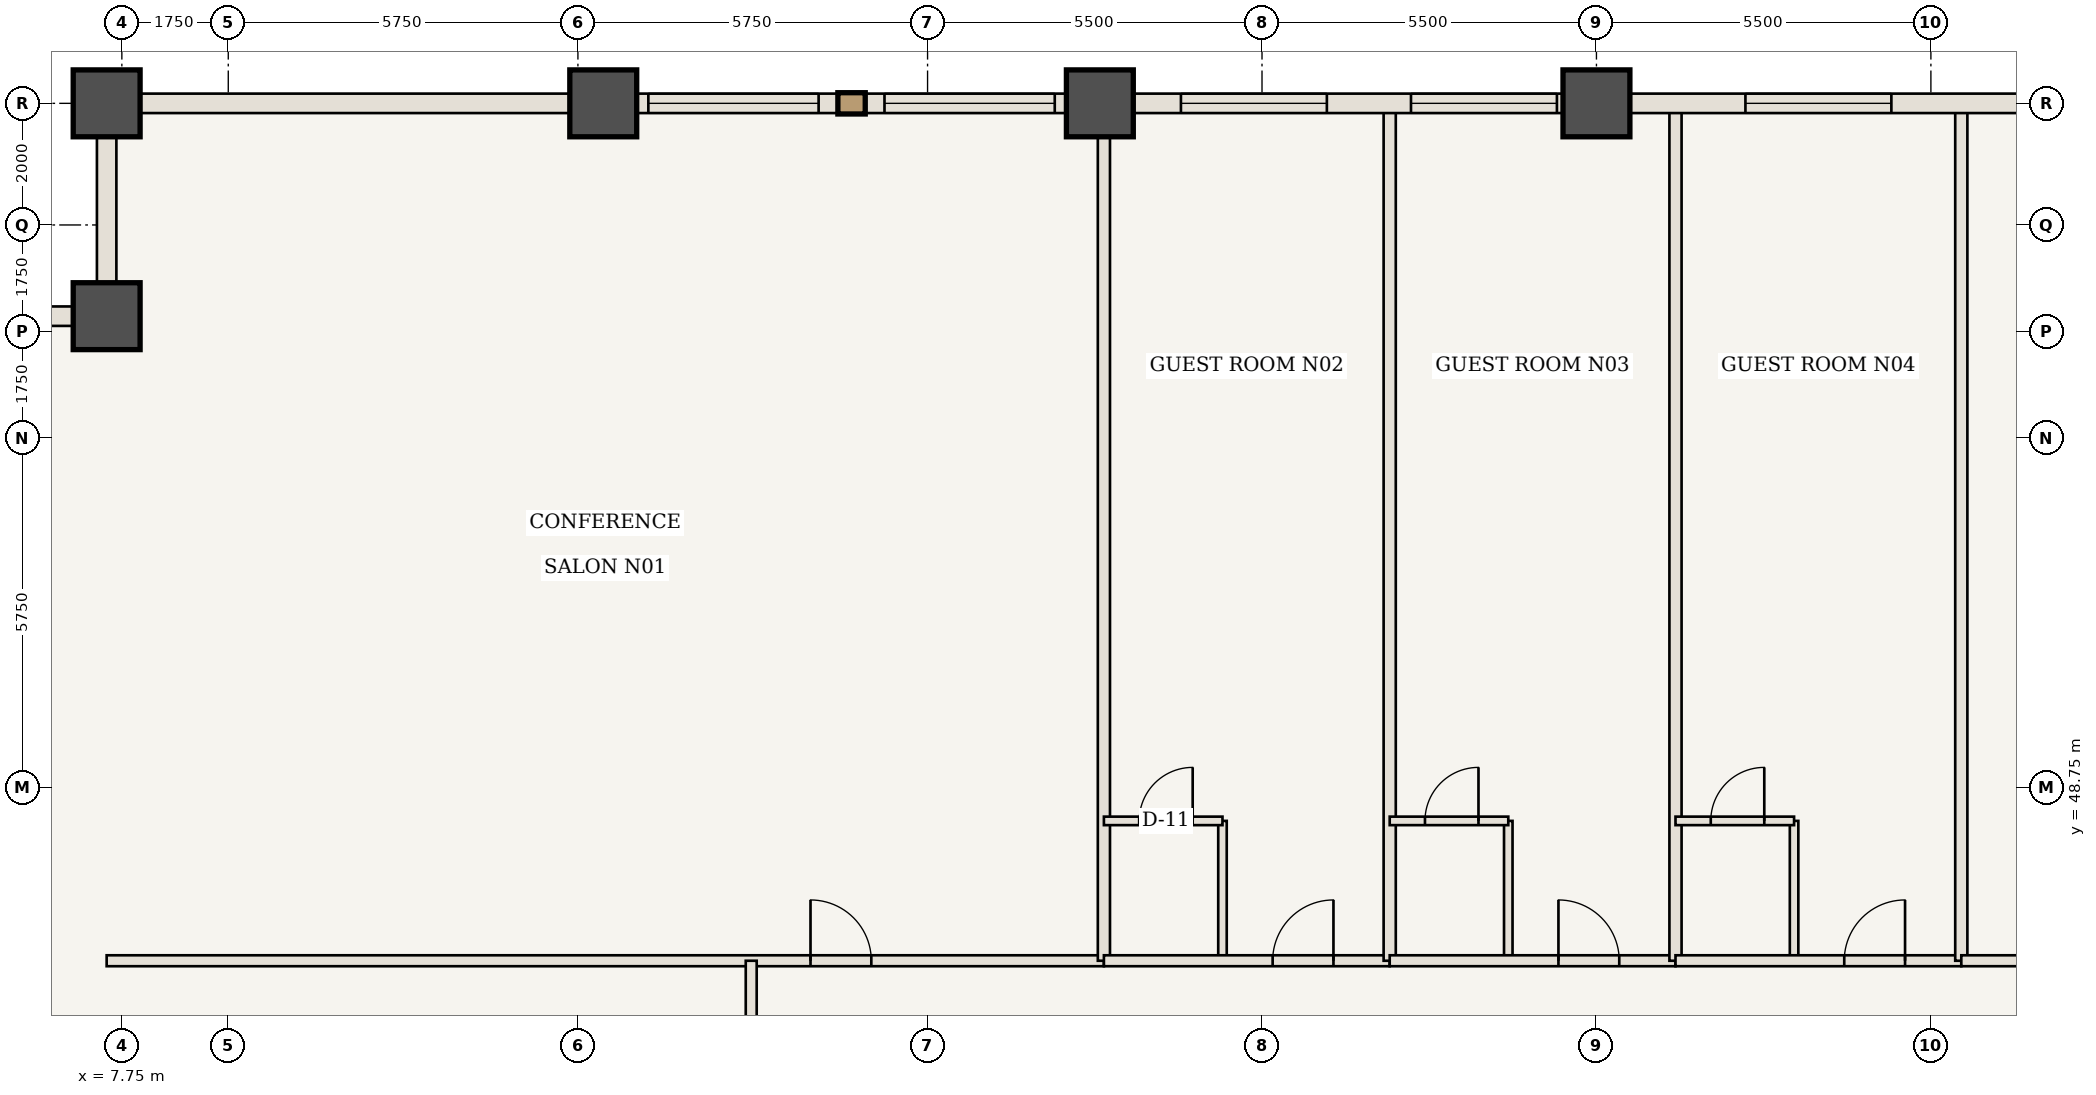
"""IFC4 building model, lengths in metres.
Left out: names, types, materials, properties, quantities, classifications, styles, units other than length and angle.
Written with IfcOpenShell. Run it as: python <this file> out.ifc"""

import sys

from ifc_helpers import new_model, si_unit, direction, frame, frame_2d, origin, origin_2d, place, context, subcontext, project, spatial, rectangle, extrude, element, fill, save


model = new_model("IFC4")
c1 = context("Model", 3, precision=1e-05, world=origin(), true_north=direction((0.0, 1.0)))
c2 = subcontext(c1, "Body", "Model", "MODEL_VIEW")
j1 = project(units=[si_unit("LENGTHUNIT", "METRE"), si_unit("PLANEANGLEUNIT", "RADIAN")], contexts=[c1])
p1 = place(None, origin())
s1 = spatial("IfcSite", under=j1, at=p1, CompositionType="ELEMENT")
p2 = place(p1, origin())
s2 = spatial("IfcBuilding", under=s1, at=p2, CompositionType="ELEMENT")
p3 = place(p2, frame((0.0, 0.0, 56.35)))
s3 = spatial("IfcBuildingStorey", under=s2, at=p3, CompositionType="ELEMENT", Elevation=56.35)
for number, where, z_axis, x_axis in (
    (1, (7.5, 60.0, 0.0), (0.0, 0.0, 1.0), (1.0, 0.0, 0.0)),
    (2, (7.5, 56.5, 0.0), (0.0, 0.0, 1.0), (1.0, 0.0, 0.0)),
    (3, (15.667, 60.0, 0.0), (0.0, 0.0, 1.0), (1.0, 0.0, 0.0)),
    (4, (23.833, 60.0, 0.0), (0.0, 0.0, 1.0), (1.0, 0.0, 0.0)),
    (5, (32.0, 60.0, 0.0), (0.0, 0.0, 1.0), (1.0, 0.0, 0.0)),
):
    element("IfcColumn", number, at=place(p3, frame(where, z_axis=z_axis, x_axis=x_axis)), inside=s3, PredefinedType="COLUMN", context=c2, shape_type="SweptSolid", body=[
        extrude(rectangle(XDim=1.1, YDim=1.1, at=origin_2d()), origin(), (0.0, 0.0, 1.0), 3.5),
    ])
p4 = place(p3, frame((7.5, 45.9, 0.0), z_axis=(0.0, 0.0, 1.0), x_axis=(1.0, 0.0, 0.0)))
e6 = element("IfcWall", 6, at=p4, inside=s3, PredefinedType="STANDARD", context=c2, shape_type="SweptSolid", body=[
    extrude(rectangle(XDim=16.4, YDim=0.18, at=frame_2d((8.2, 0.0))), origin(), (0.0, 0.0, 1.0), 3.32),
])
p5 = place(p4, frame((11.575, 0.0, 0.0)))
e7 = element("IfcOpeningElement", 7, at=p5, cuts=e6, PredefinedType="OPENING", context=c2, shape_type="SweptSolid", body=[
    extrude(rectangle(XDim=1.0, YDim=2.15, at=frame_2d((0.5, 1.075))), frame((0.0, 0.1, 0.0), z_axis=(0.0, -1.0, 0.0), x_axis=(1.0, 0.0, 0.0)), (0.0, 0.0, 1.0), 0.2),
])
p6 = place(p3, frame((23.9, 45.9, 0.0), z_axis=(0.0, 0.0, 1.0), x_axis=(0.0, 1.0, 0.0)))
e8 = element("IfcWall", 8, at=p6, inside=s3, PredefinedType="STANDARD", context=c2, shape_type="SweptSolid", body=[
    extrude(rectangle(XDim=14.04, YDim=0.2, at=frame_2d((7.02, 0.0))), origin(), (0.0, 0.0, 1.0), 3.32),
])
p7 = place(p3, frame((25.85, 45.9, 0.0), z_axis=(0.0, 0.0, 1.0), x_axis=(0.0, 1.0, 0.0)))
e9 = element("IfcWall", 9, at=p7, inside=s3, PredefinedType="STANDARD", context=c2, shape_type="SweptSolid", body=[
    extrude(rectangle(XDim=2.3, YDim=0.14, at=frame_2d((1.15, 0.0))), origin(), (0.0, 0.0, 1.0), 3.32),
])
p8 = place(p3, frame((23.9, 48.2, 0.0), z_axis=(0.0, 0.0, 1.0), x_axis=(1.0, 0.0, 0.0)))
e10 = element("IfcWall", 10, at=p8, inside=s3, PredefinedType="STANDARD", context=c2, shape_type="SweptSolid", body=[
    extrude(rectangle(XDim=1.95, YDim=0.14, at=frame_2d((0.975, 0.0))), origin(), (0.0, 0.0, 1.0), 3.32),
])
p9 = place(p8, frame((0.58, 0.0, 0.0)))
e11 = element("IfcOpeningElement", 11, at=p9, cuts=e10, PredefinedType="OPENING", context=c2, shape_type="SweptSolid", body=[
    extrude(rectangle(XDim=0.88, YDim=2.1, at=frame_2d((0.44, 1.05))), frame((0.0, 0.08, 0.0), z_axis=(0.0, -1.0, 0.0), x_axis=(1.0, 0.0, 0.0)), (0.0, 0.0, 1.0), 0.16),
])
p10 = place(p3, frame((23.9, 45.9, 0.0), z_axis=(0.0, 0.0, 1.0), x_axis=(1.0, 0.0, 0.0)))
e12 = element("IfcWall", 12, at=p10, inside=s3, PredefinedType="STANDARD", context=c2, shape_type="SweptSolid", body=[
    extrude(rectangle(XDim=4.7, YDim=0.18, at=frame_2d((2.35, 0.0))), origin(), (0.0, 0.0, 1.0), 3.32),
])
p11 = place(p10, frame((2.775, 0.0, 0.0)))
e13 = element("IfcOpeningElement", 13, at=p11, cuts=e12, PredefinedType="OPENING", context=c2, shape_type="SweptSolid", body=[
    extrude(rectangle(XDim=1.0, YDim=2.15, at=frame_2d((0.5, 1.075))), frame((0.0, 0.1, 0.0), z_axis=(0.0, -1.0, 0.0), x_axis=(1.0, 0.0, 0.0)), (0.0, 0.0, 1.0), 0.2),
])
p12 = place(p3, frame((28.6, 45.9, 0.0), z_axis=(0.0, 0.0, 1.0), x_axis=(0.0, 1.0, 0.0)))
e14 = element("IfcWall", 14, at=p12, inside=s3, PredefinedType="STANDARD", context=c2, shape_type="SweptSolid", body=[
    extrude(rectangle(XDim=14.04, YDim=0.2, at=frame_2d((7.02, 0.0))), origin(), (0.0, 0.0, 1.0), 3.32),
])
p13 = place(p3, frame((30.55, 45.9, 0.0), z_axis=(0.0, 0.0, 1.0), x_axis=(0.0, 1.0, 0.0)))
e15 = element("IfcWall", 15, at=p13, inside=s3, PredefinedType="STANDARD", context=c2, shape_type="SweptSolid", body=[
    extrude(rectangle(XDim=2.3, YDim=0.14, at=frame_2d((1.15, 0.0))), origin(), (0.0, 0.0, 1.0), 3.32),
])
p14 = place(p3, frame((28.6, 48.2, 0.0), z_axis=(0.0, 0.0, 1.0), x_axis=(1.0, 0.0, 0.0)))
e16 = element("IfcWall", 16, at=p14, inside=s3, PredefinedType="STANDARD", context=c2, shape_type="SweptSolid", body=[
    extrude(rectangle(XDim=1.95, YDim=0.14, at=frame_2d((0.975, 0.0))), origin(), (0.0, 0.0, 1.0), 3.32),
])
p15 = place(p14, frame((0.58, 0.0, 0.0)))
e17 = element("IfcOpeningElement", 17, at=p15, cuts=e16, PredefinedType="OPENING", context=c2, shape_type="SweptSolid", body=[
    extrude(rectangle(XDim=0.88, YDim=2.1, at=frame_2d((0.44, 1.05))), frame((0.0, 0.08, 0.0), z_axis=(0.0, -1.0, 0.0), x_axis=(1.0, 0.0, 0.0)), (0.0, 0.0, 1.0), 0.16),
])
p16 = place(p3, frame((28.6, 45.9, 0.0), z_axis=(0.0, 0.0, 1.0), x_axis=(1.0, 0.0, 0.0)))
e18 = element("IfcWall", 18, at=p16, inside=s3, PredefinedType="STANDARD", context=c2, shape_type="SweptSolid", body=[
    extrude(rectangle(XDim=4.7, YDim=0.18, at=frame_2d((2.35, 0.0))), origin(), (0.0, 0.0, 1.0), 3.32),
])
p17 = place(p16, frame((2.775, 0.0, 0.0)))
e19 = element("IfcOpeningElement", 19, at=p17, cuts=e18, PredefinedType="OPENING", context=c2, shape_type="SweptSolid", body=[
    extrude(rectangle(XDim=1.0, YDim=2.15, at=frame_2d((0.5, 1.075))), frame((0.0, 0.1, 0.0), z_axis=(0.0, -1.0, 0.0), x_axis=(1.0, 0.0, 0.0)), (0.0, 0.0, 1.0), 0.2),
])
p18 = place(p3, frame((33.3, 45.9, 0.0), z_axis=(0.0, 0.0, 1.0), x_axis=(0.0, 1.0, 0.0)))
e20 = element("IfcWall", 20, at=p18, inside=s3, PredefinedType="STANDARD", context=c2, shape_type="SweptSolid", body=[
    extrude(rectangle(XDim=14.04, YDim=0.2, at=frame_2d((7.02, 0.0))), origin(), (0.0, 0.0, 1.0), 3.32),
])
p19 = place(p3, frame((35.25, 45.9, 0.0), z_axis=(0.0, 0.0, 1.0), x_axis=(0.0, 1.0, 0.0)))
e21 = element("IfcWall", 21, at=p19, inside=s3, PredefinedType="STANDARD", context=c2, shape_type="SweptSolid", body=[
    extrude(rectangle(XDim=2.3, YDim=0.14, at=frame_2d((1.15, 0.0))), origin(), (0.0, 0.0, 1.0), 3.32),
])
p20 = place(p3, frame((33.3, 48.2, 0.0), z_axis=(0.0, 0.0, 1.0), x_axis=(1.0, 0.0, 0.0)))
e22 = element("IfcWall", 22, at=p20, inside=s3, PredefinedType="STANDARD", context=c2, shape_type="SweptSolid", body=[
    extrude(rectangle(XDim=1.95, YDim=0.14, at=frame_2d((0.975, 0.0))), origin(), (0.0, 0.0, 1.0), 3.32),
])
p21 = place(p20, frame((0.58, 0.0, 0.0)))
e23 = element("IfcOpeningElement", 23, at=p21, cuts=e22, PredefinedType="OPENING", context=c2, shape_type="SweptSolid", body=[
    extrude(rectangle(XDim=0.88, YDim=2.1, at=frame_2d((0.44, 1.05))), frame((0.0, 0.08, 0.0), z_axis=(0.0, -1.0, 0.0), x_axis=(1.0, 0.0, 0.0)), (0.0, 0.0, 1.0), 0.16),
])
p22 = place(p3, frame((33.3, 45.9, 0.0), z_axis=(0.0, 0.0, 1.0), x_axis=(1.0, 0.0, 0.0)))
e24 = element("IfcWall", 24, at=p22, inside=s3, PredefinedType="STANDARD", context=c2, shape_type="SweptSolid", body=[
    extrude(rectangle(XDim=4.7, YDim=0.18, at=frame_2d((2.35, 0.0))), origin(), (0.0, 0.0, 1.0), 3.32),
])
p23 = place(p22, frame((2.775, 0.0, 0.0)))
e25 = element("IfcOpeningElement", 25, at=p23, cuts=e24, PredefinedType="OPENING", context=c2, shape_type="SweptSolid", body=[
    extrude(rectangle(XDim=1.0, YDim=2.15, at=frame_2d((0.5, 1.075))), frame((0.0, 0.1, 0.0), z_axis=(0.0, -1.0, 0.0), x_axis=(1.0, 0.0, 0.0)), (0.0, 0.0, 1.0), 0.2),
])
p24 = place(p3, frame((38.0, 45.9, 0.0), z_axis=(0.0, 0.0, 1.0), x_axis=(0.0, 1.0, 0.0)))
e26 = element("IfcWall", 26, at=p24, inside=s3, PredefinedType="STANDARD", context=c2, shape_type="SweptSolid", body=[
    extrude(rectangle(XDim=14.04, YDim=0.2, at=frame_2d((7.02, 0.0))), origin(), (0.0, 0.0, 1.0), 3.32),
])
p25 = place(p3, frame((38.0, 45.9, 0.0), z_axis=(0.0, 0.0, 1.0), x_axis=(1.0, 0.0, 0.0)))
e27 = element("IfcWall", 27, at=p25, inside=s3, PredefinedType="STANDARD", context=c2, shape_type="SweptSolid", body=[
    extrude(rectangle(XDim=18.5, YDim=0.18, at=frame_2d((9.25, 0.0))), origin(), (0.0, 0.0, 1.0), 3.32),
])
p26 = place(p25, frame((4.875, 0.0, 0.0)))
e28 = element("IfcOpeningElement", 28, at=p26, cuts=e27, PredefinedType="OPENING", context=c2, shape_type="SweptSolid", body=[
    extrude(rectangle(XDim=1.0, YDim=2.15, at=frame_2d((0.5, 1.075))), frame((0.0, 0.1, 0.0), z_axis=(0.0, -1.0, 0.0), x_axis=(1.0, 0.0, 0.0)), (0.0, 0.0, 1.0), 0.2),
])
p27 = place(p3, frame((18.1, 38.5, 0.0), z_axis=(0.0, 0.0, 1.0), x_axis=(0.0, 1.0, 0.0)))
e29 = element("IfcWall", 29, at=p27, inside=s3, PredefinedType="STANDARD", context=c2, shape_type="SweptSolid", body=[
    extrude(rectangle(XDim=7.4, YDim=0.18, at=frame_2d((3.7, 0.0))), origin(), (0.0, 0.0, 1.0), 3.32),
])
p28 = place(p27, frame((4.65, 0.0, 0.0)))
e30 = element("IfcOpeningElement", 30, at=p28, cuts=e29, PredefinedType="OPENING", context=c2, shape_type="SweptSolid", body=[
    extrude(rectangle(XDim=1.0, YDim=2.15, at=frame_2d((0.5, 1.075))), frame((0.0, 0.1, 0.0), z_axis=(0.0, -1.0, 0.0), x_axis=(1.0, 0.0, 0.0)), (0.0, 0.0, 1.0), 0.2),
])
p29 = place(p3, frame((7.5, 60.0, 0.0), z_axis=(0.0, 0.0, 1.0), x_axis=(1.0, 0.0, 0.0)))
e31 = element("IfcWall", 31, at=p29, inside=s3, PredefinedType="USERDEFINED", context=c2, shape_type="SweptSolid", body=[
    extrude(rectangle(XDim=8.167, YDim=0.32, at=frame_2d((4.083, 0.0))), origin(), (0.0, 0.0, 1.0), 2.52),
])
p30 = place(p3, frame((15.667, 60.0, 0.0), z_axis=(0.0, 0.0, 1.0), x_axis=(1.0, 0.0, 0.0)))
e32 = element("IfcWall", 32, at=p30, inside=s3, PredefinedType="USERDEFINED", context=c2, shape_type="SweptSolid", body=[
    extrude(rectangle(XDim=8.167, YDim=0.32, at=frame_2d((4.083, 0.0))), origin(), (0.0, 0.0, 1.0), 2.52),
])
p31 = place(p30, frame((0.742, 0.0, 0.85)))
e33 = element("IfcOpeningElement", 33, at=p31, cuts=e32, PredefinedType="OPENING", context=c2, shape_type="SweptSolid", body=[
    extrude(rectangle(XDim=2.8, YDim=1.47, at=frame_2d((1.4, 0.735))), frame((0.0, 0.17, 0.0), z_axis=(0.0, -1.0, 0.0), x_axis=(1.0, 0.0, 0.0)), (0.0, 0.0, 1.0), 0.34),
])
p32 = place(p30, frame((4.625, 0.0, 0.85)))
e34 = element("IfcOpeningElement", 34, at=p32, cuts=e32, PredefinedType="OPENING", context=c2, shape_type="SweptSolid", body=[
    extrude(rectangle(XDim=2.8, YDim=1.47, at=frame_2d((1.4, 0.735))), frame((0.0, 0.17, 0.0), z_axis=(0.0, -1.0, 0.0), x_axis=(1.0, 0.0, 0.0)), (0.0, 0.0, 1.0), 0.34),
])
p33 = place(p3, frame((23.833, 60.0, 0.0), z_axis=(0.0, 0.0, 1.0), x_axis=(1.0, 0.0, 0.0)))
e35 = element("IfcWall", 35, at=p33, inside=s3, PredefinedType="USERDEFINED", context=c2, shape_type="SweptSolid", body=[
    extrude(rectangle(XDim=8.167, YDim=0.32, at=frame_2d((4.083, 0.0))), origin(), (0.0, 0.0, 1.0), 2.52),
])
p34 = place(p33, frame((1.333, 0.0, 0.85)))
e36 = element("IfcOpeningElement", 36, at=p34, cuts=e35, PredefinedType="OPENING", context=c2, shape_type="SweptSolid", body=[
    extrude(rectangle(XDim=2.4, YDim=1.47, at=frame_2d((1.2, 0.735))), frame((0.0, 0.17, 0.0), z_axis=(0.0, -1.0, 0.0), x_axis=(1.0, 0.0, 0.0)), (0.0, 0.0, 1.0), 0.34),
])
p35 = place(p33, frame((5.117, 0.0, 0.85)))
e37 = element("IfcOpeningElement", 37, at=p35, cuts=e35, PredefinedType="OPENING", context=c2, shape_type="SweptSolid", body=[
    extrude(rectangle(XDim=2.4, YDim=1.47, at=frame_2d((1.2, 0.735))), frame((0.0, 0.17, 0.0), z_axis=(0.0, -1.0, 0.0), x_axis=(1.0, 0.0, 0.0)), (0.0, 0.0, 1.0), 0.34),
])
p36 = place(p3, frame((32.0, 60.0, 0.0), z_axis=(0.0, 0.0, 1.0), x_axis=(1.0, 0.0, 0.0)))
e38 = element("IfcWall", 38, at=p36, inside=s3, PredefinedType="USERDEFINED", context=c2, shape_type="SweptSolid", body=[
    extrude(rectangle(XDim=8.167, YDim=0.32, at=frame_2d((4.083, 0.0))), origin(), (0.0, 0.0, 1.0), 2.52),
])
p37 = place(p36, frame((2.45, 0.0, 0.85)))
e39 = element("IfcOpeningElement", 39, at=p37, cuts=e38, PredefinedType="OPENING", context=c2, shape_type="SweptSolid", body=[
    extrude(rectangle(XDim=2.4, YDim=1.47, at=frame_2d((1.2, 0.735))), frame((0.0, 0.17, 0.0), z_axis=(0.0, -1.0, 0.0), x_axis=(1.0, 0.0, 0.0)), (0.0, 0.0, 1.0), 0.34),
])
for number, where, z_axis, x_axis in (
    (40, (7.5, 56.5, 0.0), (0.0, 0.0, 1.0), (0.0, 1.0, 0.0)),
    (41, (4.0, 56.5, 0.0), (0.0, 0.0, 1.0), (1.0, 0.0, 0.0)),
):
    element("IfcWall", number, at=place(p3, frame(where, z_axis=z_axis, x_axis=x_axis)), inside=s3, PredefinedType="USERDEFINED", context=c2, shape_type="SweptSolid", body=[
        extrude(rectangle(XDim=3.5, YDim=0.32, at=frame_2d((1.75, 0.0))), origin(), (0.0, 0.0, 1.0), 2.52),
    ])
p38 = place(p5, origin())
e42 = element("IfcDoor", 42, at=p38, inside=s3, OperationType="SINGLE_SWING_LEFT", PredefinedType="DOOR", context=c2, shape_type="SweptSolid", body=[
    extrude(rectangle(XDim=1.0, YDim=2.15, at=frame_2d((0.5, 1.075))), frame((0.0, 0.025, 0.0), z_axis=(0.0, -1.0, 0.0), x_axis=(1.0, 0.0, 0.0)), (0.0, 0.0, 1.0), 0.05),
])
fill(e7, e42)
p39 = place(p9, origin())
e43 = element("IfcDoor", 43, at=p39, inside=s3, OperationType="SINGLE_SWING_RIGHT", PredefinedType="DOOR", context=c2, shape_type="SweptSolid", body=[
    extrude(rectangle(XDim=0.88, YDim=2.1, at=frame_2d((0.44, 1.05))), frame((0.0, 0.025, 0.0), z_axis=(0.0, -1.0, 0.0), x_axis=(1.0, 0.0, 0.0)), (0.0, 0.0, 1.0), 0.05),
])
fill(e11, e43)
p40 = place(p11, origin())
e44 = element("IfcDoor", 44, at=p40, inside=s3, OperationType="SINGLE_SWING_RIGHT", PredefinedType="DOOR", context=c2, shape_type="SweptSolid", body=[
    extrude(rectangle(XDim=1.0, YDim=2.15, at=frame_2d((0.5, 1.075))), frame((0.0, 0.025, 0.0), z_axis=(0.0, -1.0, 0.0), x_axis=(1.0, 0.0, 0.0)), (0.0, 0.0, 1.0), 0.05),
])
fill(e13, e44)
p41 = place(p15, origin())
e45 = element("IfcDoor", 45, at=p41, inside=s3, OperationType="SINGLE_SWING_RIGHT", PredefinedType="DOOR", context=c2, shape_type="SweptSolid", body=[
    extrude(rectangle(XDim=0.88, YDim=2.1, at=frame_2d((0.44, 1.05))), frame((0.0, 0.025, 0.0), z_axis=(0.0, -1.0, 0.0), x_axis=(1.0, 0.0, 0.0)), (0.0, 0.0, 1.0), 0.05),
])
fill(e17, e45)
p42 = place(p17, origin())
e46 = element("IfcDoor", 46, at=p42, inside=s3, OperationType="SINGLE_SWING_LEFT", PredefinedType="DOOR", context=c2, shape_type="SweptSolid", body=[
    extrude(rectangle(XDim=1.0, YDim=2.15, at=frame_2d((0.5, 1.075))), frame((0.0, 0.025, 0.0), z_axis=(0.0, -1.0, 0.0), x_axis=(1.0, 0.0, 0.0)), (0.0, 0.0, 1.0), 0.05),
])
fill(e19, e46)
p43 = place(p21, origin())
e47 = element("IfcDoor", 47, at=p43, inside=s3, OperationType="SINGLE_SWING_RIGHT", PredefinedType="DOOR", context=c2, shape_type="SweptSolid", body=[
    extrude(rectangle(XDim=0.88, YDim=2.1, at=frame_2d((0.44, 1.05))), frame((0.0, 0.025, 0.0), z_axis=(0.0, -1.0, 0.0), x_axis=(1.0, 0.0, 0.0)), (0.0, 0.0, 1.0), 0.05),
])
fill(e23, e47)
p44 = place(p23, origin())
e48 = element("IfcDoor", 48, at=p44, inside=s3, OperationType="SINGLE_SWING_RIGHT", PredefinedType="DOOR", context=c2, shape_type="SweptSolid", body=[
    extrude(rectangle(XDim=1.0, YDim=2.15, at=frame_2d((0.5, 1.075))), frame((0.0, 0.025, 0.0), z_axis=(0.0, -1.0, 0.0), x_axis=(1.0, 0.0, 0.0)), (0.0, 0.0, 1.0), 0.05),
])
fill(e25, e48)
p45 = place(p31, origin())
e49 = element("IfcWindow", 49, at=p45, inside=s3, PartitioningType="SINGLE_PANEL", PredefinedType="WINDOW", context=c2, shape_type="SweptSolid", body=[
    extrude(rectangle(XDim=2.8, YDim=1.47, at=frame_2d((1.4, 0.735))), frame((0.0, 0.03, 0.0), z_axis=(0.0, -1.0, 0.0), x_axis=(1.0, 0.0, 0.0)), (0.0, 0.0, 1.0), 0.06),
])
fill(e33, e49)
p46 = place(p32, origin())
e50 = element("IfcWindow", 50, at=p46, inside=s3, PartitioningType="SINGLE_PANEL", PredefinedType="WINDOW", context=c2, shape_type="SweptSolid", body=[
    extrude(rectangle(XDim=2.8, YDim=1.47, at=frame_2d((1.4, 0.735))), frame((0.0, 0.03, 0.0), z_axis=(0.0, -1.0, 0.0), x_axis=(1.0, 0.0, 0.0)), (0.0, 0.0, 1.0), 0.06),
])
fill(e34, e50)
p47 = place(p34, origin())
e51 = element("IfcWindow", 51, at=p47, inside=s3, PartitioningType="SINGLE_PANEL", PredefinedType="WINDOW", context=c2, shape_type="SweptSolid", body=[
    extrude(rectangle(XDim=2.4, YDim=1.47, at=frame_2d((1.2, 0.735))), frame((0.0, 0.03, 0.0), z_axis=(0.0, -1.0, 0.0), x_axis=(1.0, 0.0, 0.0)), (0.0, 0.0, 1.0), 0.06),
])
fill(e36, e51)
p48 = place(p35, origin())
e52 = element("IfcWindow", 52, at=p48, inside=s3, PartitioningType="SINGLE_PANEL", PredefinedType="WINDOW", context=c2, shape_type="SweptSolid", body=[
    extrude(rectangle(XDim=2.4, YDim=1.47, at=frame_2d((1.2, 0.735))), frame((0.0, 0.03, 0.0), z_axis=(0.0, -1.0, 0.0), x_axis=(1.0, 0.0, 0.0)), (0.0, 0.0, 1.0), 0.06),
])
fill(e37, e52)
p49 = place(p37, origin())
e53 = element("IfcWindow", 53, at=p49, inside=s3, PartitioningType="SINGLE_PANEL", PredefinedType="WINDOW", context=c2, shape_type="SweptSolid", body=[
    extrude(rectangle(XDim=2.4, YDim=1.47, at=frame_2d((1.2, 0.735))), frame((0.0, 0.03, 0.0), z_axis=(0.0, -1.0, 0.0), x_axis=(1.0, 0.0, 0.0)), (0.0, 0.0, 1.0), 0.06),
])
fill(e39, e53)
save(model, sys.argv[1])
